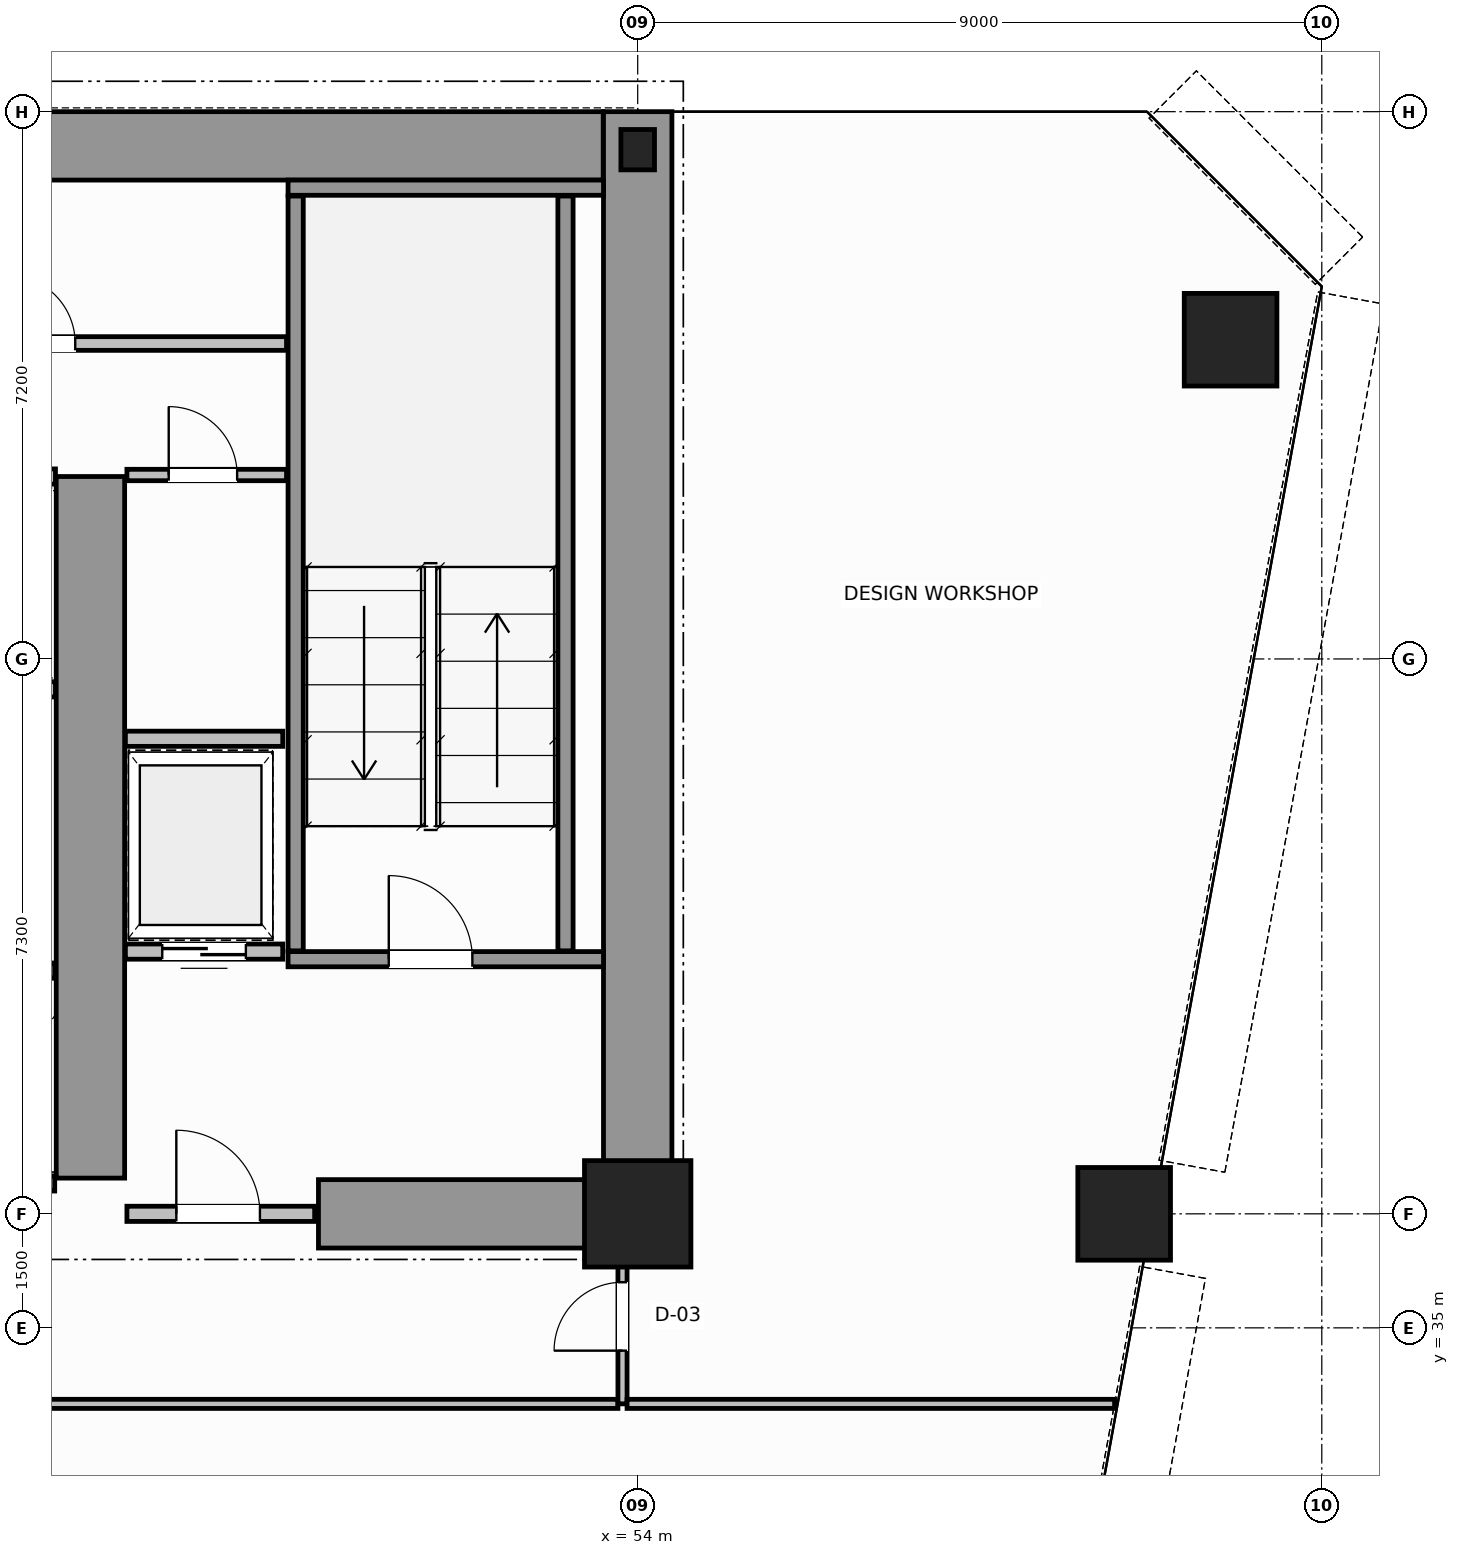
"""IFC4 building model, lengths in metres.
Left out: names, types, materials, properties, quantities, classifications, styles, units other than length and angle.
Written with IfcOpenShell. Run it as: python <this file> out.ifc"""

import sys

from ifc_helpers import new_model, si_unit, direction, frame, frame_2d, origin, origin_2d, place, context, subcontext, project, spatial, rectangle, hollow_circle, i_section, extrude, source, transform, mapped, element, fill, save


model = new_model("IFC4")
c1 = context("Model", 3, precision=1e-05, world=origin(), true_north=direction((0.0, 1.0)))
c2 = subcontext(c1, "Body", "Model", "MODEL_VIEW")
j1 = project(units=[si_unit("LENGTHUNIT", "METRE"), si_unit("PLANEANGLEUNIT", "RADIAN")], contexts=[c1])
p1 = place(None, origin())
s1 = spatial("IfcSite", under=j1, at=p1, CompositionType="ELEMENT")
p2 = place(p1, origin())
s2 = spatial("IfcBuilding", under=s1, at=p2, CompositionType="ELEMENT")
p3 = place(p2, frame((0.0, 0.0, 75.8)))
s3 = spatial("IfcBuildingStorey", under=s2, at=p3, CompositionType="ELEMENT", Elevation=75.8)
m1 = source(origin(), c2, "Body", "SweptSolid", [
    extrude(rectangle(XDim=1.4, YDim=1.4, at=origin_2d()), origin(), (0.0, 0.0, 1.0), 3.8),
])
p4 = place(p3, frame((54.0, 36.5, 0.0), z_axis=(0.0, 0.0, 1.0), x_axis=(1.0, 0.0, 0.0)))
e1 = element("IfcColumn", 1, at=p4, inside=s3, PredefinedType="COLUMN", context=c2, shape_type="MappedRepresentation", body=[
    mapped(m1, transform((0.0, 0.0, 0.0), scale=1.0)),
])
m2 = source(origin(), c2, "Body", "SweptSolid", [
    extrude(i_section(OverallWidth=0.442, OverallDepth=0.531, WebThickness=0.065, FlangeThickness=0.076, FilletRadius=0.015, at=origin_2d()), origin(), (0.0, 0.0, 1.0), 3.8),
])
p5 = place(p3, frame((54.0, 50.5, 0.0), z_axis=(0.0, 0.0, 1.0), x_axis=(1.0, 0.0, 0.0)))
e2 = element("IfcColumn", 2, at=p5, inside=s3, PredefinedType="COLUMN", context=c2, shape_type="MappedRepresentation", body=[
    mapped(m2, transform((0.0, 0.0, 0.0), scale=1.0)),
])
m3 = source(origin(), c2, "Body", "SweptSolid", [
    extrude(hollow_circle(Radius=0.61, WallThickness=0.05, at=origin_2d()), origin(), (0.0, 0.0, 1.0), 3.8),
])
for number, where, z_axis, x_axis in (
    (3, (61.8, 48.0, 0.0), (0.0, 0.0, 1.0), (1.0, 0.0, 0.0)),
    (4, (60.4, 36.5, 0.0), (0.0, 0.0, 1.0), (1.0, 0.0, 0.0)),
):
    element("IfcColumn", number, at=place(p3, frame(where, z_axis=z_axis, x_axis=x_axis)), inside=s3, PredefinedType="COLUMN", context=c2, shape_type="MappedRepresentation", body=[
        mapped(m3, transform((0.0, 0.0, 0.0), scale=1.0)),
    ])
p6 = place(p3, frame((34.002, 50.55, 0.0), z_axis=(0.0, 0.0, 1.0), x_axis=(1.0, 0.0, 0.0)))
e5 = element("IfcWall", 5, at=p6, inside=s3, PredefinedType="SHEAR", context=c2, shape_type="SweptSolid", body=[
    extrude(rectangle(XDim=19.544, YDim=0.9, at=frame_2d((9.772, 0.0))), origin(), (0.0, 0.0, 1.0), 3.8),
])
p7 = place(p3, frame((54.0, 36.5, 0.0), z_axis=(0.0, 0.0, 1.0), x_axis=(0.0, 1.0, 0.0)))
e6 = element("IfcWall", 6, at=p7, inside=s3, PredefinedType="SHEAR", context=c2, shape_type="SweptSolid", body=[
    extrude(rectangle(XDim=14.5, YDim=0.9, at=frame_2d((7.25, 0.0))), origin(), (0.0, 0.0, 1.0), 3.8),
])
p8 = place(p3, frame((49.8, 36.5, 0.0), z_axis=(0.0, 0.0, 1.0), x_axis=(1.0, 0.0, 0.0)))
e7 = element("IfcWall", 7, at=p8, inside=s3, PredefinedType="SHEAR", context=c2, shape_type="SweptSolid", body=[
    extrude(rectangle(XDim=3.73, YDim=0.9, at=frame_2d((1.865, 0.0))), origin(), (0.0, 0.0, 1.0), 2.38),
])
p9 = place(p3, frame((46.8, 36.97, 0.0), z_axis=(0.0, 0.0, 1.0), x_axis=(0.0, 1.0, 0.0)))
e8 = element("IfcWall", 8, at=p9, inside=s3, PredefinedType="SHEAR", context=c2, shape_type="SweptSolid", body=[
    extrude(rectangle(XDim=9.23, YDim=0.9, at=frame_2d((4.615, 0.0))), origin(), (0.0, 0.0, 1.0), 3.8),
])
p10 = place(p3, frame((49.4, 39.85, 0.0), z_axis=(0.0, 0.0, 1.0), x_axis=(1.0, 0.0, 0.0)))
e9 = element("IfcWall", 9, at=p10, inside=s3, PredefinedType="SOLIDWALL", context=c2, shape_type="SweptSolid", body=[
    extrude(rectangle(XDim=4.15, YDim=0.2, at=frame_2d((2.075, 0.0))), origin(), (0.0, 0.0, 1.0), 3.8),
])
p11 = place(p10, frame((1.325, 0.0, 0.0)))
e10 = element("IfcOpeningElement", 10, at=p11, cuts=e9, PredefinedType="OPENING", context=c2, shape_type="SweptSolid", body=[
    extrude(rectangle(XDim=1.1, YDim=2.15, at=frame_2d((0.55, 1.075))), frame((0.0, 0.11, 0.0), z_axis=(0.0, -1.0, 0.0), x_axis=(1.0, 0.0, 0.0)), (0.0, 0.0, 1.0), 0.22),
])
p12 = place(p3, frame((49.4, 50.0, 0.0), z_axis=(0.0, 0.0, 1.0), x_axis=(1.0, 0.0, 0.0)))
e11 = element("IfcWall", 11, at=p12, inside=s3, PredefinedType="SOLIDWALL", context=c2, shape_type="SweptSolid", body=[
    extrude(rectangle(XDim=4.15, YDim=0.2, at=frame_2d((2.075, 0.0))), origin(), (0.0, 0.0, 1.0), 3.8),
])
for number, where, z_axis, x_axis in (
    (12, (49.5, 39.96, 0.0), (0.0, 0.0, 1.0), (0.0, 1.0, 0.0)),
    (13, (53.05, 39.96, 0.0), (0.0, 0.0, 1.0), (0.0, 1.0, 0.0)),
):
    element("IfcWall", number, at=place(p3, frame(where, z_axis=z_axis, x_axis=x_axis)), inside=s3, PredefinedType="SOLIDWALL", context=c2, shape_type="SweptSolid", body=[
        extrude(rectangle(XDim=9.93, YDim=0.2, at=frame_2d((4.965, 0.0))), origin(), (0.0, 0.0, 1.0), 3.8),
    ])
p13 = place(p3, frame((47.28, 36.5, 0.0), z_axis=(0.0, 0.0, 1.0), x_axis=(1.0, 0.0, 0.0)))
e14 = element("IfcWall", 14, at=p13, inside=s3, PredefinedType="SOLIDWALL", context=c2, shape_type="SweptSolid", body=[
    extrude(rectangle(XDim=2.47, YDim=0.2, at=frame_2d((1.235, 0.0))), origin(), (0.0, 0.0, 1.0), 2.37),
])
p14 = place(p13, frame((0.65, 0.0, 0.0)))
e15 = element("IfcOpeningElement", 15, at=p14, cuts=e14, PredefinedType="OPENING", context=c2, shape_type="SweptSolid", body=[
    extrude(rectangle(XDim=1.1, YDim=2.15, at=frame_2d((0.55, 1.075))), frame((0.0, 0.11, 0.0), z_axis=(0.0, -1.0, 0.0), x_axis=(1.0, 0.0, 0.0)), (0.0, 0.0, 1.0), 0.22),
])
p15 = place(p3, frame((44.37, 39.7, 0.0), z_axis=(0.0, 0.0, 1.0), x_axis=(1.0, 0.0, 0.0)))
e16 = element("IfcWall", 16, at=p15, inside=s3, PredefinedType="SOLIDWALL", context=c2, shape_type="SweptSolid", body=[
    extrude(rectangle(XDim=1.96, YDim=0.2, at=frame_2d((0.98, 0.0))), origin(), (0.0, 0.0, 1.0), 3.58),
])
p16 = place(p3, frame((44.37, 36.9, 0.0), z_axis=(0.0, 0.0, 1.0), x_axis=(1.0, 0.0, 0.0)))
e17 = element("IfcWall", 17, at=p16, inside=s3, PredefinedType="SOLIDWALL", context=c2, shape_type="SweptSolid", body=[
    extrude(rectangle(XDim=1.96, YDim=0.2, at=frame_2d((0.98, 0.0))), origin(), (0.0, 0.0, 1.0), 2.37),
])
for number, where, z_axis, x_axis in (
    (18, (44.62, 43.4, 0.0), (0.0, 0.0, 1.0), (1.0, 0.0, 0.0)),
    (19, (44.62, 46.2, 0.0), (0.0, 0.0, 1.0), (1.0, 0.0, 0.0)),
):
    element("IfcWall", number, at=place(p3, frame(where, z_axis=z_axis, x_axis=x_axis)), inside=s3, PredefinedType="SOLIDWALL", context=c2, shape_type="SweptSolid", body=[
        extrude(rectangle(XDim=1.72, YDim=0.2, at=frame_2d((0.86, 0.0))), origin(), (0.0, 0.0, 1.0), 3.58),
    ])
p17 = place(p3, frame((47.26, 39.95, 0.0), z_axis=(0.0, 0.0, 1.0), x_axis=(1.0, 0.0, 0.0)))
e20 = element("IfcWall", 20, at=p17, inside=s3, PredefinedType="SOLIDWALL", context=c2, shape_type="SweptSolid", body=[
    extrude(rectangle(XDim=2.07, YDim=0.2, at=frame_2d((1.035, 0.0))), origin(), (0.0, 0.0, 1.0), 3.58),
])
p18 = place(p17, frame((0.485, 0.0, 0.0)))
e21 = element("IfcOpeningElement", 21, at=p18, cuts=e20, PredefinedType="OPENING", context=c2, shape_type="SweptSolid", body=[
    extrude(rectangle(XDim=1.1, YDim=2.15, at=frame_2d((0.55, 1.075))), frame((0.0, 0.11, 0.0), z_axis=(0.0, -1.0, 0.0), x_axis=(1.0, 0.0, 0.0)), (0.0, 0.0, 1.0), 0.22),
])
p19 = place(p3, frame((47.26, 42.75, 0.0), z_axis=(0.0, 0.0, 1.0), x_axis=(1.0, 0.0, 0.0)))
e22 = element("IfcWall", 22, at=p19, inside=s3, PredefinedType="SOLIDWALL", context=c2, shape_type="SweptSolid", body=[
    extrude(rectangle(XDim=2.07, YDim=0.2, at=frame_2d((1.035, 0.0))), origin(), (0.0, 0.0, 1.0), 3.58),
])
p20 = place(p3, frame((47.28, 46.22, 0.0), z_axis=(0.0, 0.0, 1.0), x_axis=(1.0, 0.0, 0.0)))
e23 = element("IfcWall", 23, at=p20, inside=s3, PredefinedType="PARTITIONING", context=c2, shape_type="SweptSolid", body=[
    extrude(rectangle(XDim=2.1, YDim=0.15, at=frame_2d((1.05, 0.0))), origin(), (0.0, 0.0, 1.0), 3.58),
])
p21 = place(p20, frame((0.55, 0.0, 0.0)))
e24 = element("IfcOpeningElement", 24, at=p21, cuts=e23, PredefinedType="OPENING", context=c2, shape_type="SweptSolid", body=[
    extrude(rectangle(XDim=0.9, YDim=2.1, at=frame_2d((0.45, 1.05))), frame((0.0, 0.085, 0.0), z_axis=(0.0, -1.0, 0.0), x_axis=(1.0, 0.0, 0.0)), (0.0, 0.0, 1.0), 0.17),
])
p22 = place(p3, frame((43.3, 47.95, 0.0), z_axis=(0.0, 0.0, 1.0), x_axis=(1.0, 0.0, 0.0)))
e25 = element("IfcWall", 25, at=p22, inside=s3, PredefinedType="PLUMBINGWALL", context=c2, shape_type="SweptSolid", body=[
    extrude(rectangle(XDim=6.08, YDim=0.18, at=frame_2d((3.04, 0.0))), origin(), (0.0, 0.0, 1.0), 3.58),
])
p23 = place(p22, frame((2.4, 0.0, 0.0)))
e26 = element("IfcOpeningElement", 26, at=p23, cuts=e25, PredefinedType="OPENING", context=c2, shape_type="SweptSolid", body=[
    extrude(rectangle(XDim=0.9, YDim=2.15, at=frame_2d((0.45, 1.075))), frame((0.0, 0.1, 0.0), z_axis=(0.0, -1.0, 0.0), x_axis=(1.0, 0.0, 0.0)), (0.0, 0.0, 1.0), 0.2),
])
p24 = place(p3, frame((32.66, 34.0, 0.0), z_axis=(0.0, 0.0, 1.0), x_axis=(1.0, 0.0, 0.0)))
e27 = element("IfcWall", 27, at=p24, inside=s3, PredefinedType="PARTITIONING", context=c2, shape_type="SweptSolid", body=[
    extrude(rectangle(XDim=21.08, YDim=0.12, at=frame_2d((10.54, 0.0))), origin(), (0.0, 0.0, 1.0), 3.58),
])
p25 = place(p3, frame((53.8, 34.0, 0.0), z_axis=(0.0, 0.0, 1.0), x_axis=(0.0, 1.0, 0.0)))
e28 = element("IfcWall", 28, at=p25, inside=s3, PredefinedType="PARTITIONING", context=c2, shape_type="SweptSolid", body=[
    extrude(rectangle(XDim=2.44, YDim=0.12, at=frame_2d((1.22, 0.0))), origin(), (0.0, 0.0, 1.0), 3.58),
])
p26 = place(p25, frame((0.7, 0.0, 0.0)))
e29 = element("IfcOpeningElement", 29, at=p26, cuts=e28, PredefinedType="OPENING", context=c2, shape_type="SweptSolid", body=[
    extrude(rectangle(XDim=0.9, YDim=2.15, at=frame_2d((0.45, 1.075))), frame((0.0, 0.07, 0.0), z_axis=(0.0, -1.0, 0.0), x_axis=(1.0, 0.0, 0.0)), (0.0, 0.0, 1.0), 0.14),
])
p27 = place(p3, frame((53.86, 34.0, 0.0), z_axis=(0.0, 0.0, 1.0), x_axis=(1.0, 0.0, 0.0)))
e30 = element("IfcWall", 30, at=p27, inside=s3, PredefinedType="PARTITIONING", context=c2, shape_type="SweptSolid", body=[
    extrude(rectangle(XDim=6.414, YDim=0.12, at=frame_2d((3.207, 0.0))), origin(), (0.0, 0.0, 1.0), 3.58),
])
m4 = source(origin(), c2, "Body", "SweptSolid", [
    extrude(rectangle(XDim=1.1, YDim=2.15, at=frame_2d((0.55, 1.075))), frame((0.0, 0.025, 0.0), z_axis=(0.0, -1.0, 0.0), x_axis=(1.0, 0.0, 0.0)), (0.0, 0.0, 1.0), 0.05),
])
p28 = place(p11, origin())
e31 = element("IfcDoor", 31, at=p28, inside=s3, OperationType="SINGLE_SWING_RIGHT", PredefinedType="DOOR", context=c2, shape_type="MappedRepresentation", body=[
    mapped(m4, transform((0.0, 0.0, 0.0), scale=1.0)),
])
fill(e10, e31)
p29 = place(p14, origin())
e32 = element("IfcDoor", 32, at=p29, inside=s3, OperationType="SINGLE_SWING_LEFT", PredefinedType="DOOR", context=c2, shape_type="MappedRepresentation", body=[
    mapped(m4, transform((0.0, 0.0, 0.0), scale=1.0)),
])
fill(e15, e32)
p30 = place(p18, origin())
e33 = element("IfcDoor", 33, at=p30, inside=s3, OperationType="DOUBLE_DOOR_SLIDING", PredefinedType="DOOR", context=c2, shape_type="MappedRepresentation", body=[
    mapped(m4, transform((0.0, 0.0, 0.0), scale=1.0)),
])
fill(e21, e33)
m5 = source(origin(), c2, "Body", "SweptSolid", [
    extrude(rectangle(XDim=0.9, YDim=2.1, at=frame_2d((0.45, 1.05))), frame((0.0, 0.025, 0.0), z_axis=(0.0, -1.0, 0.0), x_axis=(1.0, 0.0, 0.0)), (0.0, 0.0, 1.0), 0.05),
])
p31 = place(p21, origin())
e34 = element("IfcDoor", 34, at=p31, inside=s3, OperationType="SINGLE_SWING_RIGHT", PredefinedType="DOOR", context=c2, shape_type="MappedRepresentation", body=[
    mapped(m5, transform((0.0, 0.0, 0.0), scale=1.0)),
])
fill(e24, e34)
m6 = source(origin(), c2, "Body", "SweptSolid", [
    extrude(rectangle(XDim=0.9, YDim=2.15, at=frame_2d((0.45, 1.075))), frame((0.0, 0.025, 0.0), z_axis=(0.0, -1.0, 0.0), x_axis=(1.0, 0.0, 0.0)), (0.0, 0.0, 1.0), 0.05),
])
p32 = place(p23, origin())
e35 = element("IfcDoor", 35, at=p32, inside=s3, OperationType="SINGLE_SWING_RIGHT", PredefinedType="DOOR", context=c2, shape_type="MappedRepresentation", body=[
    mapped(m6, transform((0.0, 0.0, 0.0), scale=1.0)),
])
fill(e26, e35)
p33 = place(p26, origin())
e36 = element("IfcDoor", 36, at=p33, inside=s3, OperationType="SINGLE_SWING_RIGHT", PredefinedType="DOOR", context=c2, shape_type="MappedRepresentation", body=[
    mapped(m6, transform((0.0, 0.0, 0.0), scale=1.0)),
])
fill(e29, e36)
save(model, sys.argv[1])
